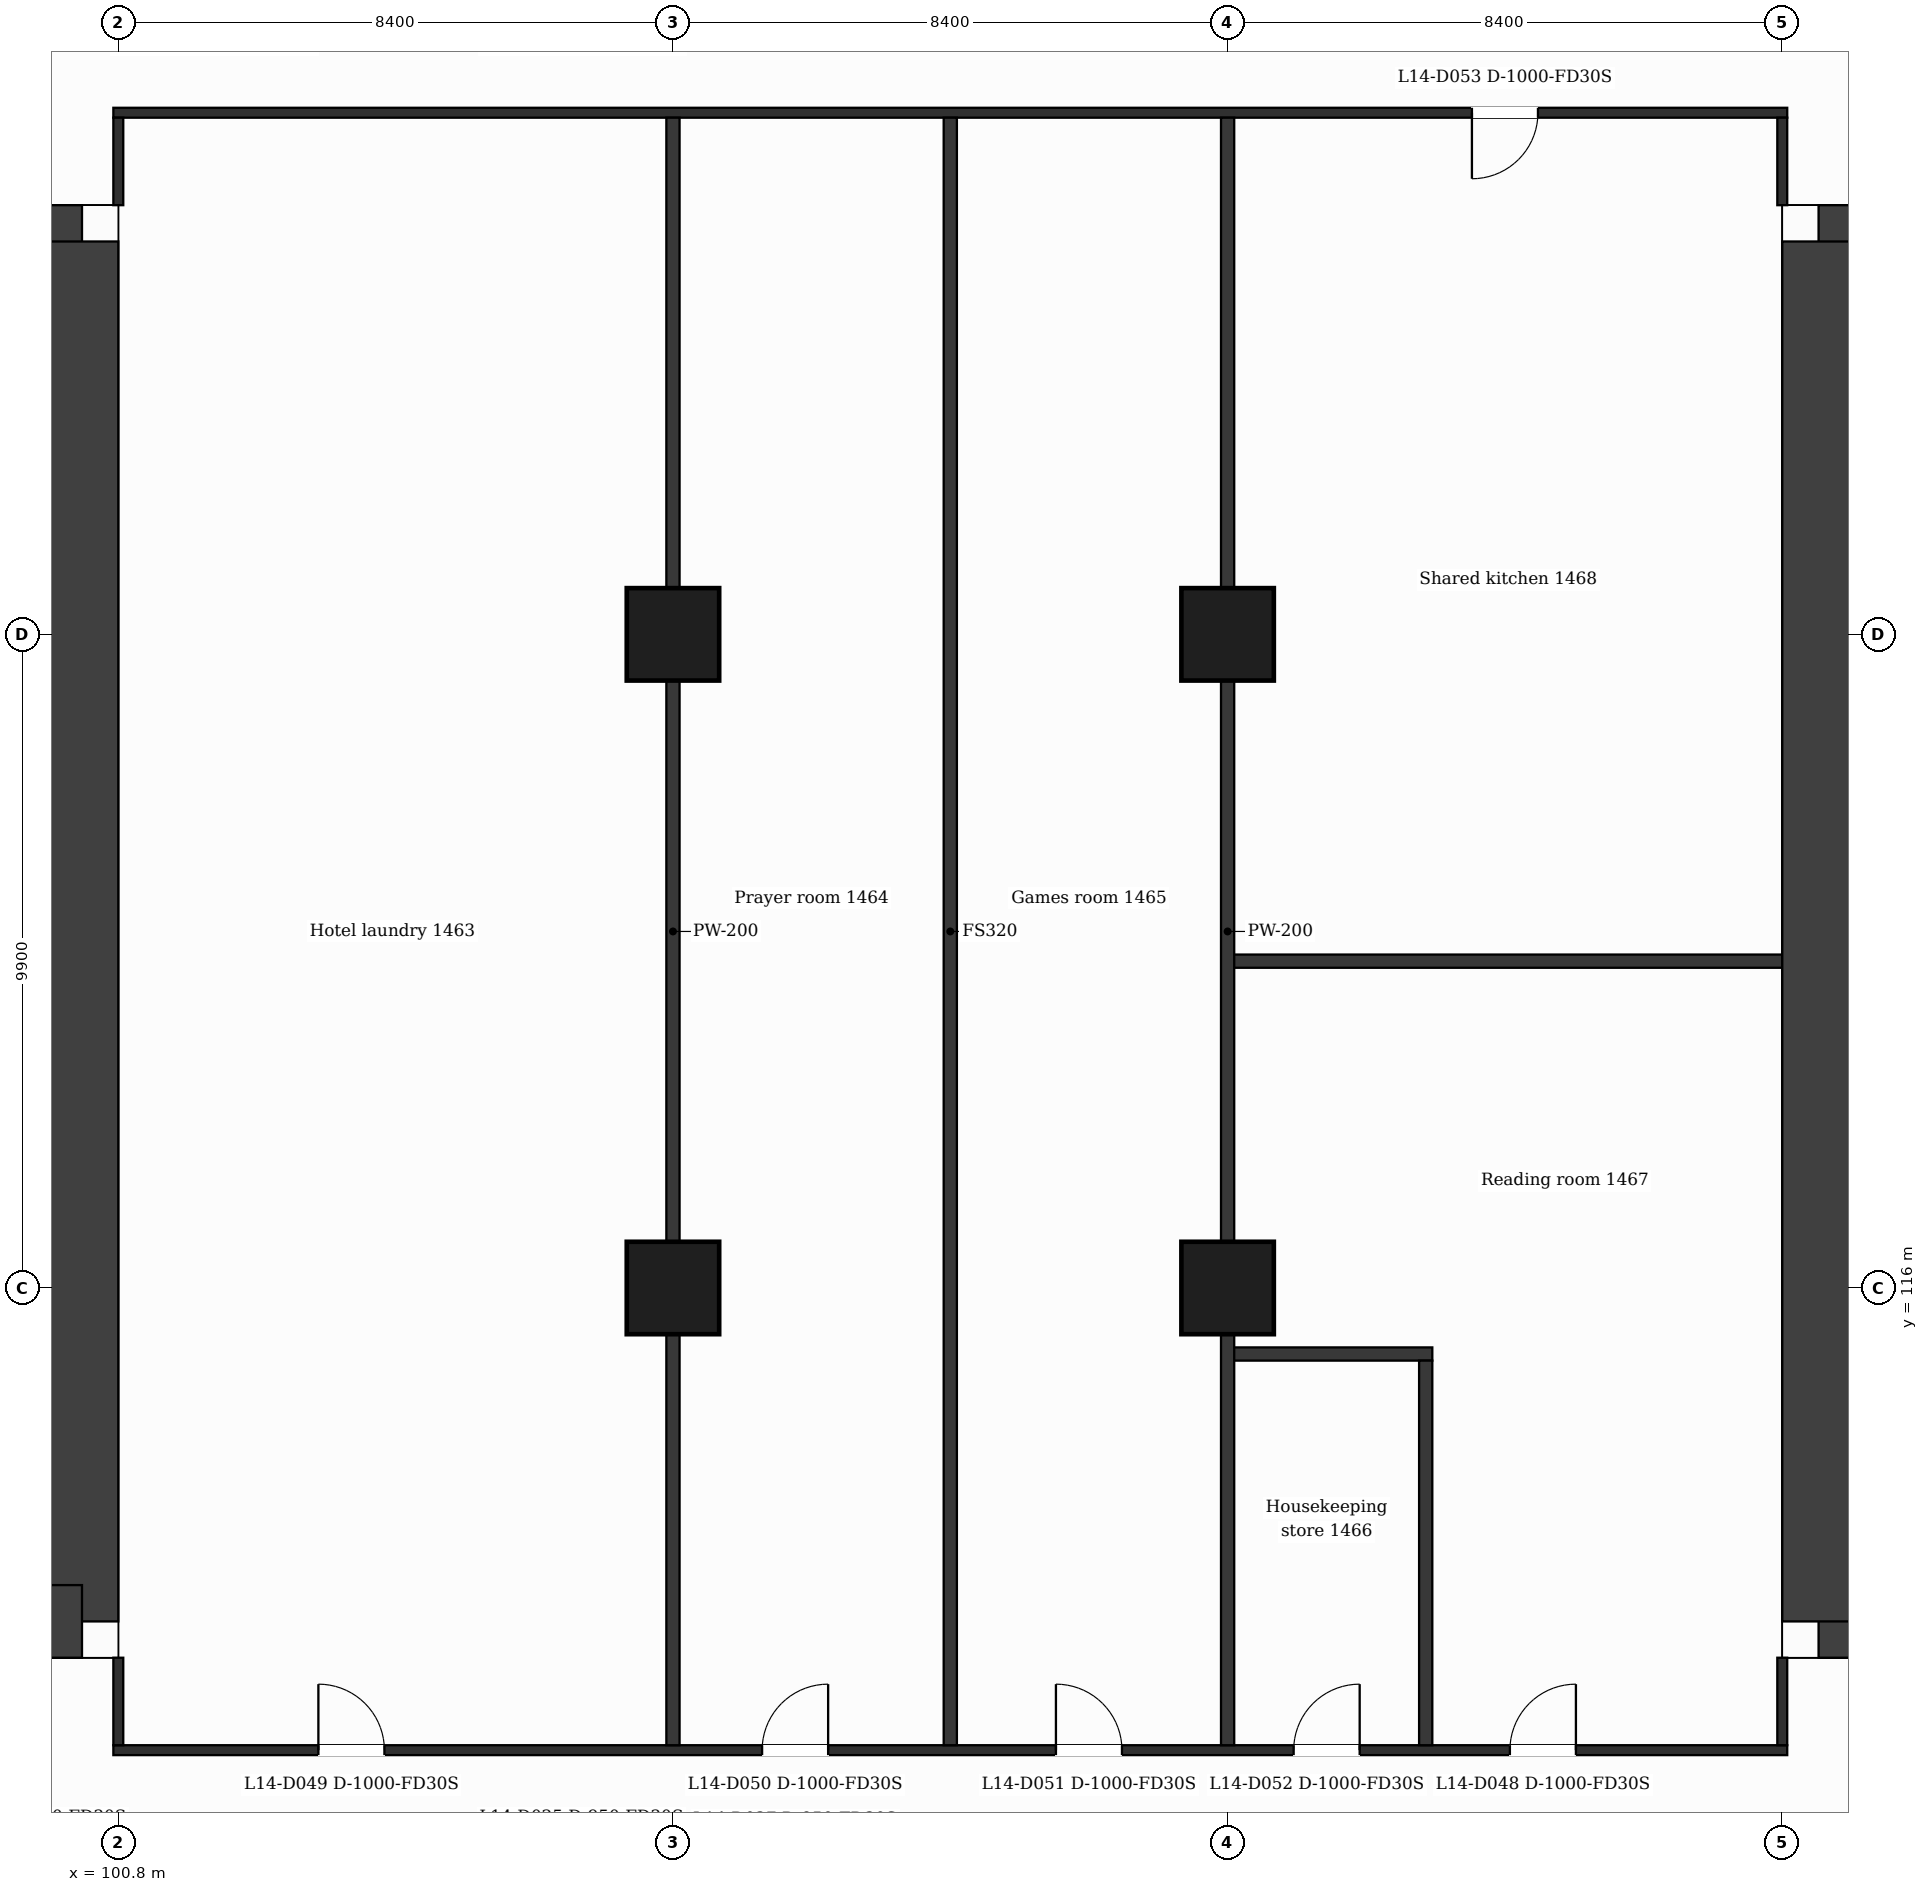
"""IFC4 building model, lengths in metres.
Left out: names, types, materials, properties, quantities, classifications, styles, units other than length and angle.
Written with IfcOpenShell. Run it as: python <this file> out.ifc"""

import sys

from ifc_helpers import new_model, si_unit, direction, frame, frame_2d, origin, origin_2d, place, context, subcontext, project, spatial, rectangle, extrude, element, fill, save


model = new_model("IFC4")
c1 = context("Model", 3, precision=1e-05, world=origin(), true_north=direction((0.0, 1.0)))
c2 = subcontext(c1, "Body", "Model", "MODEL_VIEW")
j1 = project(units=[si_unit("LENGTHUNIT", "METRE"), si_unit("PLANEANGLEUNIT", "RADIAN")], contexts=[c1])
p1 = place(None, origin())
s1 = spatial("IfcSite", under=j1, at=p1, CompositionType="ELEMENT")
p2 = place(p1, origin())
s2 = spatial("IfcBuilding", under=s1, at=p2, CompositionType="ELEMENT")
p3 = place(p2, frame((0.0, 0.0, 67.0)))
s3 = spatial("IfcBuildingStorey", under=s2, at=p3, CompositionType="ELEMENT", Elevation=67.0)
p4 = place(p3, frame((89.112, 131.85, 0.0), z_axis=(0.0, 0.0, 1.0), x_axis=(1.0, 0.0, 0.0)))
e1 = element("IfcWall", 1, at=p4, inside=s3, PredefinedType="SHEAR", context=c2, shape_type="SweptSolid", body=[
    extrude(rectangle(XDim=11.138, YDim=1.1, at=frame_2d((5.569, 0.0))), origin(), (0.0, 0.0, 1.0), 3.5),
])
p5 = place(p4, frame((6.552, 0.0, 0.0)))
e2 = element("IfcOpeningElement", 2, at=p5, cuts=e1, PredefinedType="OPENING", context=c2, shape_type="SweptSolid", body=[
    extrude(rectangle(XDim=1.2, YDim=2.1, at=frame_2d((0.6, 1.05))), frame((0.0, 0.56, 0.0), z_axis=(0.0, -1.0, 0.0), x_axis=(1.0, 0.0, 0.0)), (0.0, 0.0, 1.0), 1.12),
])
p6 = place(p3, frame((100.25, 131.85, 0.0), z_axis=(0.0, 0.0, 1.0), x_axis=(0.0, -1.0, 0.0)))
e3 = element("IfcWall", 3, at=p6, inside=s3, PredefinedType="SHEAR", context=c2, shape_type="SweptSolid", body=[
    extrude(rectangle(XDim=20.9, YDim=1.1, at=frame_2d((10.45, 0.0))), origin(), (0.0, 0.0, 1.0), 3.5),
])
p7 = place(p3, frame((100.25, 110.95, 0.0), z_axis=(0.0, 0.0, 1.0), x_axis=(-1.0, 0.0, 0.0)))
e4 = element("IfcWall", 4, at=p7, inside=s3, PredefinedType="SHEAR", context=c2, shape_type="SweptSolid", body=[
    extrude(rectangle(XDim=13.952, YDim=1.1, at=frame_2d((6.976, 0.0))), origin(), (0.0, 0.0, 1.0), 3.5),
])
p8 = place(p7, frame((5.748, 0.0, 0.0)))
e5 = element("IfcOpeningElement", 5, at=p8, cuts=e4, PredefinedType="OPENING", context=c2, shape_type="SweptSolid", body=[
    extrude(rectangle(XDim=1.4, YDim=2.1, at=frame_2d((0.7, 1.05))), frame((0.0, 0.56, 0.0), z_axis=(0.0, -1.0, 0.0), x_axis=(1.0, 0.0, 0.0)), (0.0, 0.0, 1.0), 1.12),
])
p9 = place(p3, frame((126.55, 131.85, 0.0), z_axis=(0.0, 0.0, 1.0), x_axis=(1.0, 0.0, 0.0)))
e6 = element("IfcWall", 6, at=p9, inside=s3, PredefinedType="SHEAR", context=c2, shape_type="SweptSolid", body=[
    extrude(rectangle(XDim=11.138, YDim=1.1, at=frame_2d((5.569, 0.0))), origin(), (0.0, 0.0, 1.0), 3.5),
])
p10 = place(p9, frame((3.386, 0.0, 0.0)))
e7 = element("IfcOpeningElement", 7, at=p10, cuts=e6, PredefinedType="OPENING", context=c2, shape_type="SweptSolid", body=[
    extrude(rectangle(XDim=1.2, YDim=2.1, at=frame_2d((0.6, 1.05))), frame((0.0, 0.56, 0.0), z_axis=(0.0, -1.0, 0.0), x_axis=(1.0, 0.0, 0.0)), (0.0, 0.0, 1.0), 1.12),
])
p11 = place(p3, frame((140.502, 110.95, 0.0), z_axis=(0.0, 0.0, 1.0), x_axis=(-1.0, 0.0, 0.0)))
e8 = element("IfcWall", 8, at=p11, inside=s3, PredefinedType="SHEAR", context=c2, shape_type="SweptSolid", body=[
    extrude(rectangle(XDim=13.952, YDim=1.1, at=frame_2d((6.976, 0.0))), origin(), (0.0, 0.0, 1.0), 3.5),
])
p12 = place(p11, frame((6.804, 0.0, 0.0)))
e9 = element("IfcOpeningElement", 9, at=p12, cuts=e8, PredefinedType="OPENING", context=c2, shape_type="SweptSolid", body=[
    extrude(rectangle(XDim=1.4, YDim=2.1, at=frame_2d((0.7, 1.05))), frame((0.0, 0.56, 0.0), z_axis=(0.0, -1.0, 0.0), x_axis=(1.0, 0.0, 0.0)), (0.0, 0.0, 1.0), 1.12),
])
p13 = place(p3, frame((126.55, 110.95, 0.0), z_axis=(0.0, 0.0, 1.0), x_axis=(0.0, 1.0, 0.0)))
e10 = element("IfcWall", 10, at=p13, inside=s3, PredefinedType="SHEAR", context=c2, shape_type="SweptSolid", body=[
    extrude(rectangle(XDim=20.9, YDim=1.1, at=frame_2d((10.45, 0.0))), origin(), (0.0, 0.0, 1.0), 3.5),
])
for number, where, z_axis, x_axis in (
    (11, (109.2, 116.0, 0.0), (0.0, 0.0, 1.0), (1.0, 0.0, 0.0)),
    (12, (117.6, 116.0, 0.0), (0.0, 0.0, 1.0), (1.0, 0.0, 0.0)),
    (13, (109.2, 125.9, 0.0), (0.0, 0.0, 1.0), (1.0, 0.0, 0.0)),
    (14, (117.6, 125.9, 0.0), (0.0, 0.0, 1.0), (1.0, 0.0, 0.0)),
):
    element("IfcColumn", number, at=place(p3, frame(where, z_axis=z_axis, x_axis=x_axis)), inside=s3, PredefinedType="COLUMN", context=c2, shape_type="SweptSolid", body=[
        extrude(rectangle(XDim=1.4, YDim=1.4, at=origin_2d()), origin(), (0.0, 0.0, 1.0), 3.5),
    ])
p14 = place(p3, frame((100.725, 109.0, 0.0), z_axis=(0.0, 0.0, 1.0), x_axis=(1.0, 0.0, 0.0)))
e15 = element("IfcWall", 15, at=p14, inside=s3, PredefinedType="PARTITIONING", context=c2, shape_type="SweptSolid", body=[
    extrude(rectangle(XDim=25.35, YDim=0.15, at=frame_2d((12.675, 0.0))), origin(), (0.0, 0.0, 1.0), 3.18),
])
p15 = place(p14, frame((21.15, 0.0, 0.0)))
e16 = element("IfcOpeningElement", 16, at=p15, cuts=e15, PredefinedType="OPENING", context=c2, shape_type="SweptSolid", body=[
    extrude(rectangle(XDim=1.0, YDim=2.1, at=frame_2d((0.5, 1.05))), frame((0.0, 0.085, 0.0), z_axis=(0.0, -1.0, 0.0), x_axis=(1.0, 0.0, 0.0)), (0.0, 0.0, 1.0), 0.17),
])
p16 = place(p14, frame((3.105, 0.0, 0.0)))
e17 = element("IfcOpeningElement", 17, at=p16, cuts=e15, PredefinedType="OPENING", context=c2, shape_type="SweptSolid", body=[
    extrude(rectangle(XDim=1.0, YDim=2.1, at=frame_2d((0.5, 1.05))), frame((0.0, 0.085, 0.0), z_axis=(0.0, -1.0, 0.0), x_axis=(1.0, 0.0, 0.0)), (0.0, 0.0, 1.0), 0.17),
])
p17 = place(p14, frame((9.825, 0.0, 0.0)))
e18 = element("IfcOpeningElement", 18, at=p17, cuts=e15, PredefinedType="OPENING", context=c2, shape_type="SweptSolid", body=[
    extrude(rectangle(XDim=1.0, YDim=2.1, at=frame_2d((0.5, 1.05))), frame((0.0, 0.085, 0.0), z_axis=(0.0, -1.0, 0.0), x_axis=(1.0, 0.0, 0.0)), (0.0, 0.0, 1.0), 0.17),
])
p18 = place(p14, frame((14.275, 0.0, 0.0)))
e19 = element("IfcOpeningElement", 19, at=p18, cuts=e15, PredefinedType="OPENING", context=c2, shape_type="SweptSolid", body=[
    extrude(rectangle(XDim=1.0, YDim=2.1, at=frame_2d((0.5, 1.05))), frame((0.0, 0.085, 0.0), z_axis=(0.0, -1.0, 0.0), x_axis=(1.0, 0.0, 0.0)), (0.0, 0.0, 1.0), 0.17),
])
p19 = place(p14, frame((17.875, 0.0, 0.0)))
e20 = element("IfcOpeningElement", 20, at=p19, cuts=e15, PredefinedType="OPENING", context=c2, shape_type="SweptSolid", body=[
    extrude(rectangle(XDim=1.0, YDim=2.1, at=frame_2d((0.5, 1.05))), frame((0.0, 0.085, 0.0), z_axis=(0.0, -1.0, 0.0), x_axis=(1.0, 0.0, 0.0)), (0.0, 0.0, 1.0), 0.17),
])
p20 = place(p3, frame((117.6, 115.0, 0.0), z_axis=(0.0, 0.0, 1.0), x_axis=(1.0, 0.0, 0.0)))
e21 = element("IfcWall", 21, at=p20, inside=s3, PredefinedType="PARTITIONING", context=c2, shape_type="SweptSolid", body=[
    extrude(rectangle(XDim=3.1, YDim=0.2, at=frame_2d((1.55, 0.0))), origin(), (0.0, 0.0, 1.0), 3.18),
])
p21 = place(p3, frame((117.6, 120.95, 0.0), z_axis=(0.0, 0.0, 1.0), x_axis=(1.0, 0.0, 0.0)))
e22 = element("IfcWall", 22, at=p21, inside=s3, PredefinedType="PARTITIONING", context=c2, shape_type="SweptSolid", body=[
    extrude(rectangle(XDim=8.4, YDim=0.2, at=frame_2d((4.2, 0.0))), origin(), (0.0, 0.0, 1.0), 3.18),
])
p22 = place(p3, frame((100.725, 133.8, 0.0), z_axis=(0.0, 0.0, 1.0), x_axis=(1.0, 0.0, 0.0)))
e23 = element("IfcWall", 23, at=p22, inside=s3, PredefinedType="PARTITIONING", context=c2, shape_type="SweptSolid", body=[
    extrude(rectangle(XDim=25.35, YDim=0.15, at=frame_2d((12.675, 0.0))), origin(), (0.0, 0.0, 1.0), 3.18),
])
p23 = place(p22, frame((20.575, 0.0, 0.0)))
e24 = element("IfcOpeningElement", 24, at=p23, cuts=e23, PredefinedType="OPENING", context=c2, shape_type="SweptSolid", body=[
    extrude(rectangle(XDim=1.0, YDim=2.1, at=frame_2d((0.5, 1.05))), frame((0.0, 0.085, 0.0), z_axis=(0.0, -1.0, 0.0), x_axis=(1.0, 0.0, 0.0)), (0.0, 0.0, 1.0), 0.17),
])
p24 = place(p3, frame((100.8, 109.075, 0.0), z_axis=(0.0, 0.0, 1.0), x_axis=(0.0, 1.0, 0.0)))
e25 = element("IfcWall", 25, at=p24, inside=s3, PredefinedType="PARTITIONING", context=c2, shape_type="SweptSolid", body=[
    extrude(rectangle(XDim=1.325, YDim=0.15, at=frame_2d((0.663, 0.0))), origin(), (0.0, 0.0, 1.0), 3.18),
])
p25 = place(p3, frame((100.8, 132.4, 0.0), z_axis=(0.0, 0.0, 1.0), x_axis=(0.0, 1.0, 0.0)))
e26 = element("IfcWall", 26, at=p25, inside=s3, PredefinedType="PARTITIONING", context=c2, shape_type="SweptSolid", body=[
    extrude(rectangle(XDim=1.325, YDim=0.15, at=frame_2d((0.663, 0.0))), origin(), (0.0, 0.0, 1.0), 3.18),
])
for number, where, z_axis, x_axis in (
    (27, (109.2, 109.075, 0.0), (0.0, 0.0, 1.0), (0.0, 1.0, 0.0)),
    (28, (113.4, 109.075, 0.0), (0.0, 0.0, 1.0), (0.0, 1.0, 0.0)),
    (29, (117.6, 109.075, 0.0), (0.0, 0.0, 1.0), (0.0, 1.0, 0.0)),
):
    element("IfcWall", number, at=place(p3, frame(where, z_axis=z_axis, x_axis=x_axis)), inside=s3, PredefinedType="PARTITIONING", context=c2, shape_type="SweptSolid", body=[
        extrude(rectangle(XDim=24.65, YDim=0.2, at=frame_2d((12.325, 0.0))), origin(), (0.0, 0.0, 1.0), 3.18),
    ])
p26 = place(p3, frame((120.6, 109.075, 0.0), z_axis=(0.0, 0.0, 1.0), x_axis=(0.0, 1.0, 0.0)))
e30 = element("IfcWall", 30, at=p26, inside=s3, PredefinedType="PARTITIONING", context=c2, shape_type="SweptSolid", body=[
    extrude(rectangle(XDim=5.825, YDim=0.2, at=frame_2d((2.913, 0.0))), origin(), (0.0, 0.0, 1.0), 3.18),
])
p27 = place(p3, frame((126.0, 109.075, 0.0), z_axis=(0.0, 0.0, 1.0), x_axis=(0.0, 1.0, 0.0)))
e31 = element("IfcWall", 31, at=p27, inside=s3, PredefinedType="PARTITIONING", context=c2, shape_type="SweptSolid", body=[
    extrude(rectangle(XDim=1.325, YDim=0.15, at=frame_2d((0.663, 0.0))), origin(), (0.0, 0.0, 1.0), 3.18),
])
p28 = place(p3, frame((126.0, 132.4, 0.0), z_axis=(0.0, 0.0, 1.0), x_axis=(0.0, 1.0, 0.0)))
e32 = element("IfcWall", 32, at=p28, inside=s3, PredefinedType="PARTITIONING", context=c2, shape_type="SweptSolid", body=[
    extrude(rectangle(XDim=1.325, YDim=0.15, at=frame_2d((0.663, 0.0))), origin(), (0.0, 0.0, 1.0), 3.18),
])
p29 = place(p15, origin())
e33 = element("IfcDoor", 33, at=p29, inside=s3, OperationType="SINGLE_SWING_RIGHT", PredefinedType="DOOR", context=c2, shape_type="SweptSolid", body=[
    extrude(rectangle(XDim=1.0, YDim=2.1, at=frame_2d((0.5, 1.05))), frame((0.0, 0.025, 0.0), z_axis=(0.0, -1.0, 0.0), x_axis=(1.0, 0.0, 0.0)), (0.0, 0.0, 1.0), 0.05),
])
fill(e16, e33)
p30 = place(p16, origin())
e34 = element("IfcDoor", 34, at=p30, inside=s3, OperationType="SINGLE_SWING_LEFT", PredefinedType="DOOR", context=c2, shape_type="SweptSolid", body=[
    extrude(rectangle(XDim=1.0, YDim=2.1, at=frame_2d((0.5, 1.05))), frame((0.0, 0.025, 0.0), z_axis=(0.0, -1.0, 0.0), x_axis=(1.0, 0.0, 0.0)), (0.0, 0.0, 1.0), 0.05),
])
fill(e17, e34)
p31 = place(p17, origin())
e35 = element("IfcDoor", 35, at=p31, inside=s3, OperationType="SINGLE_SWING_RIGHT", PredefinedType="DOOR", context=c2, shape_type="SweptSolid", body=[
    extrude(rectangle(XDim=1.0, YDim=2.1, at=frame_2d((0.5, 1.05))), frame((0.0, 0.025, 0.0), z_axis=(0.0, -1.0, 0.0), x_axis=(1.0, 0.0, 0.0)), (0.0, 0.0, 1.0), 0.05),
])
fill(e18, e35)
p32 = place(p18, origin())
e36 = element("IfcDoor", 36, at=p32, inside=s3, OperationType="SINGLE_SWING_LEFT", PredefinedType="DOOR", context=c2, shape_type="SweptSolid", body=[
    extrude(rectangle(XDim=1.0, YDim=2.1, at=frame_2d((0.5, 1.05))), frame((0.0, 0.025, 0.0), z_axis=(0.0, -1.0, 0.0), x_axis=(1.0, 0.0, 0.0)), (0.0, 0.0, 1.0), 0.05),
])
fill(e19, e36)
p33 = place(p19, origin())
e37 = element("IfcDoor", 37, at=p33, inside=s3, OperationType="SINGLE_SWING_RIGHT", PredefinedType="DOOR", context=c2, shape_type="SweptSolid", body=[
    extrude(rectangle(XDim=1.0, YDim=2.1, at=frame_2d((0.5, 1.05))), frame((0.0, 0.025, 0.0), z_axis=(0.0, -1.0, 0.0), x_axis=(1.0, 0.0, 0.0)), (0.0, 0.0, 1.0), 0.05),
])
fill(e20, e37)
p34 = place(p23, origin())
e38 = element("IfcDoor", 38, at=p34, inside=s3, OperationType="SINGLE_SWING_LEFT", PredefinedType="DOOR", context=c2, shape_type="SweptSolid", body=[
    extrude(rectangle(XDim=1.0, YDim=2.1, at=frame_2d((0.5, 1.05))), frame((0.0, 0.025, 0.0), z_axis=(0.0, -1.0, 0.0), x_axis=(1.0, 0.0, 0.0)), (0.0, 0.0, 1.0), 0.05),
])
fill(e24, e38)
save(model, sys.argv[1])
